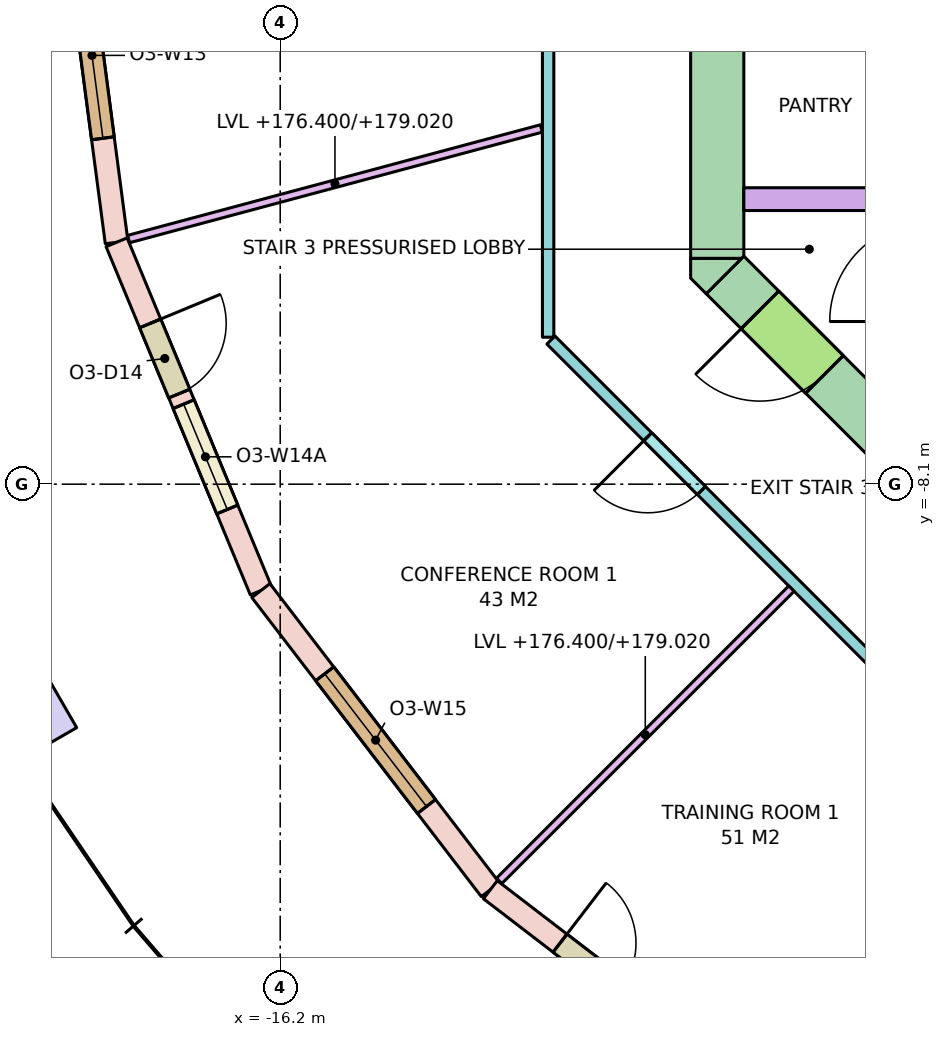
"""IFC4 building model, lengths in metres.
Left out: names, types, materials, properties, quantities, classifications, styles, units other than length and angle.
Written with IfcOpenShell. Run it as: python <this file> out.ifc"""

import sys

from ifc_helpers import new_model, si_unit, direction, frame, frame_2d, origin, origin_2d, place, context, subcontext, project, spatial, polyline, rectangle, outline, extrude, element, fill, save


model = new_model("IFC4")
c1 = context("Model", 3, precision=1e-05, world=origin(), true_north=direction((0.0, 1.0)))
c2 = subcontext(c1, "Body", "Model", "MODEL_VIEW")
j1 = project(units=[si_unit("LENGTHUNIT", "METRE"), si_unit("PLANEANGLEUNIT", "RADIAN")], contexts=[c1])
p1 = place(None, origin())
s1 = spatial("IfcSite", under=j1, at=p1, CompositionType="ELEMENT")
p2 = place(p1, origin())
s2 = spatial("IfcBuilding", under=s1, at=p2, CompositionType="ELEMENT")
p3 = place(p2, frame((0.0, 0.0, 176.4)))
s3 = spatial("IfcBuildingStorey", under=s2, at=p3, CompositionType="ELEMENT", Elevation=176.4)
p4 = place(p3, frame((-19.486, -11.25, 0.0), z_axis=(0.0, 0.0, 1.0), x_axis=(0.5, -0.866025403784, 0.0)))
e1 = element("IfcColumn", 1, at=p4, inside=s3, PredefinedType="COLUMN", context=c2, shape_type="SweptSolid", body=[
    extrude(rectangle(XDim=0.7, YDim=1.0, at=origin_2d()), origin(), (0.0, 0.0, 1.0), 3.7),
])
p5 = place(p3, frame((-10.45, -5.13, -0.28), z_axis=(0.0, 0.0, 1.0), x_axis=(0.0, 1.0, 0.0)))
e2 = element("IfcWall", 2, at=p5, inside=s3, PredefinedType="SHEAR", context=c2, shape_type="SweptSolid", body=[
    extrude(rectangle(XDim=10.26, YDim=0.7, at=frame_2d((5.13, 0.0))), origin(), (0.0, 0.0, 1.0), 3.7),
])
p6 = place(p5, frame((4.13, 0.0, 0.28)))
e3 = element("IfcOpeningElement", 3, at=p6, cuts=e2, PredefinedType="OPENING", context=c2, shape_type="SweptSolid", body=[
    extrude(rectangle(XDim=2.0, YDim=2.1, at=frame_2d((1.0, 1.05))), frame((0.0, 0.36, 0.0), z_axis=(0.0, -1.0, 0.0), x_axis=(1.0, 0.0, 0.0)), (0.0, 0.0, 1.0), 0.72),
])
p7 = place(p3, frame((-7.347, -8.347, -0.28), z_axis=(0.0, 0.0, 1.0), x_axis=(-0.707106781187, 0.707106781187, 0.0)))
e4 = element("IfcWall", 4, at=p7, inside=s3, PredefinedType="SHEAR", context=c2, shape_type="SweptSolid", body=[
    extrude(rectangle(XDim=4.243, YDim=0.7, at=frame_2d((2.121, 0.0))), origin(), (0.0, 0.0, 1.0), 3.7),
])
p8 = place(p7, frame((2.393, 0.0, 0.28)))
e5 = element("IfcOpeningElement", 5, at=p8, cuts=e4, PredefinedType="OPENING", context=c2, shape_type="SweptSolid", body=[
    extrude(rectangle(XDim=1.2, YDim=2.1, at=frame_2d((0.6, 1.05))), frame((0.0, 0.36, 0.0), z_axis=(0.0, -1.0, 0.0), x_axis=(1.0, 0.0, 0.0)), (0.0, 0.0, 1.0), 0.72),
])
p9 = place(p3, frame((0.0, 0.0, -0.28)))
e6 = element("IfcWall", 6, at=p9, inside=s3, PredefinedType="SHEAR", context=c2, shape_type="SweptSolid", body=[
    extrude(outline(polyline([(-10.8, -5.39), (-10.8, -5.13), (-10.8, -5.13), (-10.13, -5.13), (-10.595, -5.595), (-10.595, -5.595), (-10.595, -5.595), (-10.8, -5.39)])), origin(), (0.0, 0.0, 1.0), 3.7),
])
p10 = place(p3, frame((-10.1, -4.35, 0.0), z_axis=(0.0, 0.0, 1.0), x_axis=(1.0, 0.0, 0.0)))
e7 = element("IfcWall", 7, at=p10, inside=s3, PredefinedType="SOLIDWALL", context=c2, shape_type="SweptSolid", body=[
    extrude(rectangle(XDim=8.1, YDim=0.3, at=frame_2d((4.05, 0.0))), origin(), (0.0, 0.0, 1.0), 3.42),
])
p11 = place(p3, frame((-19.0, 0.0, 0.0), z_axis=(0.0, 0.0, 1.0), x_axis=(0.130538549191, -0.991443234469, 0.0)))
e8 = element("IfcWall", 8, at=p11, inside=s3, PredefinedType="STANDARD", context=c2, shape_type="SweptSolid", body=[
    extrude(rectangle(XDim=4.96, YDim=0.3, at=frame_2d((2.48, 0.0))), origin(), (0.0, 0.0, 1.0), 3.42),
])
p12 = place(p11, frame((1.38, 0.0, 0.8)))
e9 = element("IfcOpeningElement", 9, at=p12, cuts=e8, PredefinedType="OPENING", context=c2, shape_type="SweptSolid", body=[
    extrude(rectangle(XDim=2.2, YDim=2.4, at=frame_2d((1.1, 1.2))), frame((0.0, 0.16, 0.0), z_axis=(0.0, -1.0, 0.0), x_axis=(1.0, 0.0, 0.0)), (0.0, 0.0, 1.0), 0.32),
])
p13 = place(p3, frame((-18.353, -4.917, 0.0), z_axis=(0.0, 0.0, 1.0), x_axis=(0.382650301762, -0.923893254961, 0.0)))
e10 = element("IfcWall", 10, at=p13, inside=s3, PredefinedType="STANDARD", context=c2, shape_type="SweptSolid", body=[
    extrude(rectangle(XDim=4.96, YDim=0.3, at=frame_2d((2.48, 0.0))), origin(), (0.0, 0.0, 1.0), 3.42),
])
p14 = place(p13, frame((1.155, 0.0, 0.0)))
e11 = element("IfcOpeningElement", 11, at=p14, cuts=e10, PredefinedType="OPENING", context=c2, shape_type="SweptSolid", body=[
    extrude(rectangle(XDim=1.0, YDim=2.4, at=frame_2d((0.5, 1.2))), frame((0.0, 0.16, 0.0), z_axis=(0.0, -1.0, 0.0), x_axis=(1.0, 0.0, 0.0)), (0.0, 0.0, 1.0), 0.32),
])
p15 = place(p13, frame((2.305, 0.0, 0.8)))
e12 = element("IfcOpeningElement", 12, at=p15, cuts=e10, PredefinedType="OPENING", context=c2, shape_type="SweptSolid", body=[
    extrude(rectangle(XDim=1.5, YDim=2.4, at=frame_2d((0.75, 1.2))), frame((0.0, 0.16, 0.0), z_axis=(0.0, -1.0, 0.0), x_axis=(1.0, 0.0, 0.0)), (0.0, 0.0, 1.0), 0.32),
])
p16 = place(p3, frame((-16.455, -9.5, 0.0), z_axis=(0.0, 0.0, 1.0), x_axis=(0.608768356425, -0.793348024649, 0.0)))
e13 = element("IfcWall", 13, at=p16, inside=s3, PredefinedType="STANDARD", context=c2, shape_type="SweptSolid", body=[
    extrude(rectangle(XDim=4.96, YDim=0.3, at=frame_2d((2.48, 0.0))), origin(), (0.0, 0.0, 1.0), 3.42),
])
p17 = place(p16, frame((1.38, 0.0, 0.8)))
e14 = element("IfcOpeningElement", 14, at=p17, cuts=e13, PredefinedType="OPENING", context=c2, shape_type="SweptSolid", body=[
    extrude(rectangle(XDim=2.2, YDim=2.4, at=frame_2d((1.1, 1.2))), frame((0.0, 0.16, 0.0), z_axis=(0.0, -1.0, 0.0), x_axis=(1.0, 0.0, 0.0)), (0.0, 0.0, 1.0), 0.32),
])
p18 = place(p3, frame((-13.435, -13.435, 0.0), z_axis=(0.0, 0.0, 1.0), x_axis=(0.793348024649, -0.608768356425, 0.0)))
e15 = element("IfcWall", 15, at=p18, inside=s3, PredefinedType="STANDARD", context=c2, shape_type="SweptSolid", body=[
    extrude(rectangle(XDim=4.96, YDim=0.3, at=frame_2d((2.48, 0.0))), origin(), (0.0, 0.0, 1.0), 3.42),
])
p19 = place(p18, frame((1.155, 0.0, 0.0)))
e16 = element("IfcOpeningElement", 16, at=p19, cuts=e15, PredefinedType="OPENING", context=c2, shape_type="SweptSolid", body=[
    extrude(rectangle(XDim=1.0, YDim=2.4, at=frame_2d((0.5, 1.2))), frame((0.0, 0.16, 0.0), z_axis=(0.0, -1.0, 0.0), x_axis=(1.0, 0.0, 0.0)), (0.0, 0.0, 1.0), 0.32),
])
p20 = place(p18, frame((2.305, 0.0, 0.8)))
e17 = element("IfcOpeningElement", 17, at=p20, cuts=e15, PredefinedType="OPENING", context=c2, shape_type="SweptSolid", body=[
    extrude(rectangle(XDim=1.5, YDim=2.4, at=frame_2d((0.75, 1.2))), frame((0.0, 0.16, 0.0), z_axis=(0.0, -1.0, 0.0), x_axis=(1.0, 0.0, 0.0)), (0.0, 0.0, 1.0), 0.32),
])
p21 = place(p3, frame((-8.204, -10.638, 0.0), z_axis=(0.0, 0.0, 1.0), x_axis=(-0.707106781187, 0.707106781187, 0.0)))
e18 = element("IfcWall", 18, at=p21, inside=s3, PredefinedType="PARTITIONING", context=c2, shape_type="SweptSolid", body=[
    extrude(rectangle(XDim=6.271, YDim=0.15, at=frame_2d((3.135, 0.0))), origin(), (0.0, 0.0, 1.0), 2.62),
])
p22 = place(p21, frame((3.471, 0.0, 0.0)))
e19 = element("IfcOpeningElement", 19, at=p22, cuts=e18, PredefinedType="OPENING", context=c2, shape_type="SweptSolid", body=[
    extrude(rectangle(XDim=1.0, YDim=2.1, at=frame_2d((0.5, 1.05))), frame((0.0, 0.085, 0.0), z_axis=(0.0, -1.0, 0.0), x_axis=(1.0, 0.0, 0.0)), (0.0, 0.0, 1.0), 0.17),
])
p23 = place(p3, frame((-12.675, -6.167, 0.0), z_axis=(0.0, 0.0, 1.0), x_axis=(0.0, 1.0, 0.0)))
e20 = element("IfcWall", 20, at=p23, inside=s3, PredefinedType="PARTITIONING", context=c2, shape_type="SweptSolid", body=[
    extrude(rectangle(XDim=12.333, YDim=0.15, at=frame_2d((6.167, 0.0))), origin(), (0.0, 0.0, 1.0), 2.62),
])
p24 = place(p23, frame((8.325, 0.0, 0.0)))
e21 = element("IfcOpeningElement", 21, at=p24, cuts=e20, PredefinedType="OPENING", context=c2, shape_type="SweptSolid", body=[
    extrude(rectangle(XDim=1.8, YDim=2.1, at=frame_2d((0.9, 1.05))), frame((0.0, 0.085, 0.0), z_axis=(0.0, -1.0, 0.0), x_axis=(1.0, 0.0, 0.0)), (0.0, 0.0, 1.0), 0.17),
])
p25 = place(p23, frame((4.018, 0.0, 0.0)))
e22 = element("IfcOpeningElement", 22, at=p25, cuts=e20, PredefinedType="OPENING", context=c2, shape_type="SweptSolid", body=[
    extrude(rectangle(XDim=0.9, YDim=2.1, at=frame_2d((0.45, 1.05))), frame((0.0, 0.085, 0.0), z_axis=(0.0, -1.0, 0.0), x_axis=(1.0, 0.0, 0.0)), (0.0, 0.0, 1.0), 0.17),
])
p26 = place(p3, frame((-12.764, -3.42, 0.0), z_axis=(0.0, 0.0, 1.0), x_axis=(-0.965925759926, -0.258819292773, 0.0)))
e23 = element("IfcWall", 23, at=p26, inside=s3, PredefinedType="PARTITIONING", context=c2, shape_type="SweptSolid", body=[
    extrude(rectangle(XDim=5.622, YDim=0.1, at=frame_2d((2.811, 0.0))), origin(), (0.0, 0.0, 1.0), 2.62),
])
p27 = place(p3, frame((-9.474, -9.474, 0.0), z_axis=(0.0, 0.0, 1.0), x_axis=(-0.707106781187, -0.707106781187, 0.0)))
e24 = element("IfcWall", 24, at=p27, inside=s3, PredefinedType="PARTITIONING", context=c2, shape_type="SweptSolid", body=[
    extrude(rectangle(XDim=5.439, YDim=0.1, at=frame_2d((2.719, 0.0))), origin(), (0.0, 0.0, 1.0), 2.62),
])
p28 = place(p12, origin())
e25 = element("IfcWindow", 25, at=p28, inside=s3, PartitioningType="SINGLE_PANEL", PredefinedType="WINDOW", context=c2, shape_type="SweptSolid", body=[
    extrude(rectangle(XDim=2.2, YDim=2.4, at=frame_2d((1.1, 1.2))), frame((0.0, 0.03, 0.0), z_axis=(0.0, -1.0, 0.0), x_axis=(1.0, 0.0, 0.0)), (0.0, 0.0, 1.0), 0.06),
])
fill(e9, e25)
p29 = place(p14, origin())
e26 = element("IfcDoor", 26, at=p29, inside=s3, OperationType="SINGLE_SWING_LEFT", PredefinedType="DOOR", context=c2, shape_type="SweptSolid", body=[
    extrude(rectangle(XDim=1.0, YDim=2.4, at=frame_2d((0.5, 1.2))), frame((0.0, 0.025, 0.0), z_axis=(0.0, -1.0, 0.0), x_axis=(1.0, 0.0, 0.0)), (0.0, 0.0, 1.0), 0.05),
])
fill(e11, e26)
p30 = place(p15, origin())
e27 = element("IfcWindow", 27, at=p30, inside=s3, PartitioningType="SINGLE_PANEL", PredefinedType="WINDOW", context=c2, shape_type="SweptSolid", body=[
    extrude(rectangle(XDim=1.5, YDim=2.4, at=frame_2d((0.75, 1.2))), frame((0.0, 0.03, 0.0), z_axis=(0.0, -1.0, 0.0), x_axis=(1.0, 0.0, 0.0)), (0.0, 0.0, 1.0), 0.06),
])
fill(e12, e27)
p31 = place(p17, origin())
e28 = element("IfcWindow", 28, at=p31, inside=s3, PartitioningType="SINGLE_PANEL", PredefinedType="WINDOW", context=c2, shape_type="SweptSolid", body=[
    extrude(rectangle(XDim=2.2, YDim=2.4, at=frame_2d((1.1, 1.2))), frame((0.0, 0.03, 0.0), z_axis=(0.0, -1.0, 0.0), x_axis=(1.0, 0.0, 0.0)), (0.0, 0.0, 1.0), 0.06),
])
fill(e14, e28)
p32 = place(p19, origin())
e29 = element("IfcDoor", 29, at=p32, inside=s3, OperationType="SINGLE_SWING_LEFT", PredefinedType="DOOR", context=c2, shape_type="SweptSolid", body=[
    extrude(rectangle(XDim=1.0, YDim=2.4, at=frame_2d((0.5, 1.2))), frame((0.0, 0.025, 0.0), z_axis=(0.0, -1.0, 0.0), x_axis=(1.0, 0.0, 0.0)), (0.0, 0.0, 1.0), 0.05),
])
fill(e16, e29)
p33 = place(p8, origin())
e30 = element("IfcDoor", 30, at=p33, inside=s3, OperationType="SINGLE_SWING_RIGHT", PredefinedType="DOOR", context=c2, shape_type="SweptSolid", body=[
    extrude(rectangle(XDim=1.2, YDim=2.1, at=frame_2d((0.6, 1.05))), frame((0.0, 0.025, 0.0), z_axis=(0.0, -1.0, 0.0), x_axis=(1.0, 0.0, 0.0)), (0.0, 0.0, 1.0), 0.05),
])
fill(e5, e30)
p34 = place(p22, origin())
e31 = element("IfcDoor", 31, at=p34, inside=s3, OperationType="SINGLE_SWING_RIGHT", PredefinedType="DOOR", context=c2, shape_type="SweptSolid", body=[
    extrude(rectangle(XDim=1.0, YDim=2.1, at=frame_2d((0.5, 1.05))), frame((0.0, 0.025, 0.0), z_axis=(0.0, -1.0, 0.0), x_axis=(1.0, 0.0, 0.0)), (0.0, 0.0, 1.0), 0.05),
])
fill(e19, e31)
save(model, sys.argv[1])
